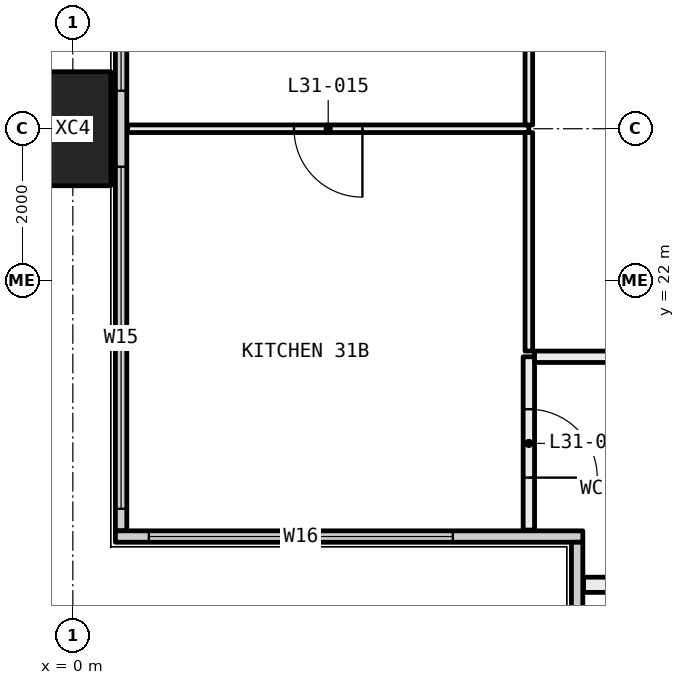
"""IFC4 building model, lengths in metres.
Left out: names, types, materials, properties, quantities, classifications, styles, units other than length and angle.
Written with IfcOpenShell. Run it as: python <this file> out.ifc"""

import sys

from ifc_helpers import new_model, si_unit, direction, frame, frame_2d, origin, origin_2d, place, context, subcontext, project, spatial, rectangle, hollow_rectangle, extrude, element, fill, save


model = new_model("IFC4")
c1 = context("Model", 3, precision=1e-05, world=origin(), true_north=direction((0.0, 1.0)))
c2 = subcontext(c1, "Body", "Model", "MODEL_VIEW")
j1 = project(units=[si_unit("LENGTHUNIT", "METRE"), si_unit("PLANEANGLEUNIT", "RADIAN")], contexts=[c1])
p1 = place(None, origin())
s1 = spatial("IfcSite", under=j1, at=p1, CompositionType="ELEMENT")
p2 = place(p1, origin())
s2 = spatial("IfcBuilding", under=s1, at=p2, CompositionType="ELEMENT")
p3 = place(p2, frame((0.0, 0.0, 120.75)))
s3 = spatial("IfcBuildingStorey", under=s2, at=p3, CompositionType="ELEMENT", Elevation=120.75)
p4 = place(p3, frame((0.0, 24.0, -0.4), z_axis=(0.0, 0.0, 1.0), x_axis=(0.0, 1.0, 0.0)))
e1 = element("IfcColumn", 1, at=p4, inside=s3, PredefinedType="COLUMN", context=c2, shape_type="SweptSolid", body=[
    extrude(hollow_rectangle(XDim=1.5, YDim=1.0, WallThickness=0.06, at=origin_2d()), origin(), (0.0, 0.0, 1.0), 3.45),
])
p5 = place(p3, frame((0.635, 18.71, 0.0), z_axis=(0.0, 0.0, 1.0), x_axis=(0.0, 1.0, 0.0)))
e2 = element("IfcWall", 2, at=p5, inside=s3, PredefinedType="ELEMENTEDWALL", context=c2, shape_type="SweptSolid", body=[
    extrude(rectangle(XDim=22.58, YDim=0.15, at=frame_2d((11.29, 0.0))), origin(), (0.0, 0.0, 1.0), 3.05),
])
p6 = place(p5, frame((0.29, 0.0, 0.45)))
e3 = element("IfcOpeningElement", 3, at=p6, cuts=e2, PredefinedType="OPENING", context=c2, shape_type="SweptSolid", body=[
    extrude(rectangle(XDim=4.5, YDim=2.55, at=frame_2d((2.25, 1.275))), frame((0.0, 0.085, 0.0), z_axis=(0.0, -1.0, 0.0), x_axis=(1.0, 0.0, 0.0)), (0.0, 0.0, 1.0), 0.17),
])
p7 = place(p5, frame((5.79, 0.0, 0.45)))
e4 = element("IfcOpeningElement", 4, at=p7, cuts=e2, PredefinedType="OPENING", context=c2, shape_type="SweptSolid", body=[
    extrude(rectangle(XDim=3.75, YDim=2.55, at=frame_2d((1.875, 1.275))), frame((0.0, 0.085, 0.0), z_axis=(0.0, -1.0, 0.0), x_axis=(1.0, 0.0, 0.0)), (0.0, 0.0, 1.0), 0.17),
])
p8 = place(p5, frame((13.04, 0.0, 0.45)))
e5 = element("IfcOpeningElement", 5, at=p8, cuts=e2, PredefinedType="OPENING", context=c2, shape_type="SweptSolid", body=[
    extrude(rectangle(XDim=0.75, YDim=2.55, at=frame_2d((0.375, 1.275))), frame((0.0, 0.085, 0.0), z_axis=(0.0, -1.0, 0.0), x_axis=(1.0, 0.0, 0.0)), (0.0, 0.0, 1.0), 0.17),
])
p9 = place(p5, frame((14.79, 0.0, 0.45)))
e6 = element("IfcOpeningElement", 6, at=p9, cuts=e2, PredefinedType="OPENING", context=c2, shape_type="SweptSolid", body=[
    extrude(rectangle(XDim=2.0, YDim=2.55, at=frame_2d((1.0, 1.275))), frame((0.0, 0.085, 0.0), z_axis=(0.0, -1.0, 0.0), x_axis=(1.0, 0.0, 0.0)), (0.0, 0.0, 1.0), 0.17),
])
p10 = place(p5, frame((17.79, 0.0, 0.45)))
e7 = element("IfcOpeningElement", 7, at=p10, cuts=e2, PredefinedType="OPENING", context=c2, shape_type="SweptSolid", body=[
    extrude(rectangle(XDim=4.5, YDim=2.55, at=frame_2d((2.25, 1.275))), frame((0.0, 0.085, 0.0), z_axis=(0.0, -1.0, 0.0), x_axis=(1.0, 0.0, 0.0)), (0.0, 0.0, 1.0), 0.17),
])
p11 = place(p3, frame((0.56, 18.635, 0.0), z_axis=(0.0, 0.0, 1.0), x_axis=(1.0, 0.0, 0.0)))
e8 = element("IfcWall", 8, at=p11, inside=s3, PredefinedType="ELEMENTEDWALL", context=c2, shape_type="SweptSolid", body=[
    extrude(rectangle(XDim=6.15, YDim=0.15, at=frame_2d((3.075, 0.0))), origin(), (0.0, 0.0, 1.0), 3.05),
])
p12 = place(p11, frame((0.44, 0.0, 0.45)))
e9 = element("IfcOpeningElement", 9, at=p12, cuts=e8, PredefinedType="OPENING", context=c2, shape_type="SweptSolid", body=[
    extrude(rectangle(XDim=4.0, YDim=2.55, at=frame_2d((2.0, 1.275))), frame((0.0, 0.085, 0.0), z_axis=(0.0, -1.0, 0.0), x_axis=(1.0, 0.0, 0.0)), (0.0, 0.0, 1.0), 0.17),
])
p13 = place(p3, frame((6.635, 12.71, 0.0), z_axis=(0.0, 0.0, 1.0), x_axis=(0.0, 1.0, 0.0)))
e10 = element("IfcWall", 10, at=p13, inside=s3, PredefinedType="ELEMENTEDWALL", context=c2, shape_type="SweptSolid", body=[
    extrude(rectangle(XDim=5.85, YDim=0.15, at=frame_2d((2.925, 0.0))), origin(), (0.0, 0.0, 1.0), 3.05),
])
p14 = place(p13, frame((0.29, 0.0, 0.45)))
e11 = element("IfcOpeningElement", 11, at=p14, cuts=e10, PredefinedType="OPENING", context=c2, shape_type="SweptSolid", body=[
    extrude(rectangle(XDim=4.0, YDim=2.55, at=frame_2d((2.0, 1.275))), frame((0.0, 0.085, 0.0), z_axis=(0.0, -1.0, 0.0), x_axis=(1.0, 0.0, 0.0)), (0.0, 0.0, 1.0), 0.17),
])
p15 = place(p3, frame((7.8, 18.0, 0.0), z_axis=(0.0, 0.0, 1.0), x_axis=(-1.0, 0.0, 0.0)))
e12 = element("IfcWall", 12, at=p15, inside=s3, PredefinedType="PARTITIONING", context=c2, shape_type="SweptSolid", body=[
    extrude(rectangle(XDim=1.08, YDim=0.2, at=frame_2d((0.54, 0.0))), origin(), (0.0, 0.0, 1.0), 3.05),
])
p16 = place(p3, frame((6.0, 24.0, 0.0), z_axis=(0.0, 0.0, 1.0), x_axis=(-1.0, 0.0, 0.0)))
e13 = element("IfcWall", 13, at=p16, inside=s3, PredefinedType="PARTITIONING", context=c2, shape_type="SweptSolid", body=[
    extrude(rectangle(XDim=5.28, YDim=0.1, at=frame_2d((2.64, 0.0))), origin(), (0.0, 0.0, 1.0), 2.45),
])
p17 = place(p16, frame((2.19, 0.0, 0.0)))
e14 = element("IfcOpeningElement", 14, at=p17, cuts=e13, PredefinedType="OPENING", context=c2, shape_type="SweptSolid", body=[
    extrude(rectangle(XDim=0.9, YDim=2.1, at=frame_2d((0.45, 1.05))), frame((0.0, 0.06, 0.0), z_axis=(0.0, -1.0, 0.0), x_axis=(1.0, 0.0, 0.0)), (0.0, 0.0, 1.0), 0.12),
])
p18 = place(p3, frame((6.0, 18.72, 0.0), z_axis=(0.0, 0.0, 1.0), x_axis=(0.0, 1.0, 0.0)))
e15 = element("IfcWall", 15, at=p18, inside=s3, PredefinedType="PARTITIONING", context=c2, shape_type="SweptSolid", body=[
    extrude(rectangle(XDim=2.28, YDim=0.15, at=frame_2d((1.14, 0.0))), origin(), (0.0, 0.0, 1.0), 3.05),
])
p19 = place(p18, frame((0.69, 0.0, 0.0)))
e16 = element("IfcOpeningElement", 16, at=p19, cuts=e15, PredefinedType="OPENING", context=c2, shape_type="SweptSolid", body=[
    extrude(rectangle(XDim=0.9, YDim=2.1, at=frame_2d((0.45, 1.05))), frame((0.0, 0.085, 0.0), z_axis=(0.0, -1.0, 0.0), x_axis=(1.0, 0.0, 0.0)), (0.0, 0.0, 1.0), 0.17),
])
p20 = place(p3, frame((6.0, 21.075, 0.0), z_axis=(0.0, 0.0, 1.0), x_axis=(0.0, 1.0, 0.0)))
e17 = element("IfcWall", 17, at=p20, inside=s3, PredefinedType="PARTITIONING", context=c2, shape_type="SweptSolid", body=[
    extrude(rectangle(XDim=2.875, YDim=0.1, at=frame_2d((1.438, 0.0))), origin(), (0.0, 0.0, 1.0), 2.45),
])
p21 = place(p3, frame((6.0, 24.05, 0.0), z_axis=(0.0, 0.0, 1.0), x_axis=(0.0, 1.0, 0.0)))
e18 = element("IfcWall", 18, at=p21, inside=s3, PredefinedType="PARTITIONING", context=c2, shape_type="SweptSolid", body=[
    extrude(rectangle(XDim=8.95, YDim=0.1, at=frame_2d((4.475, 0.0))), origin(), (0.0, 0.0, 1.0), 2.45),
])
p22 = place(p3, frame((7.725, 21.0, 0.0), z_axis=(0.0, 0.0, 1.0), x_axis=(-1.0, 0.0, 0.0)))
e19 = element("IfcWall", 19, at=p22, inside=s3, PredefinedType="PARTITIONING", context=c2, shape_type="SweptSolid", body=[
    extrude(rectangle(XDim=1.65, YDim=0.15, at=frame_2d((0.825, 0.0))), origin(), (0.0, 0.0, 1.0), 3.05),
])
p23 = place(p6, origin())
e20 = element("IfcWindow", 20, at=p23, inside=s3, PartitioningType="SINGLE_PANEL", PredefinedType="WINDOW", context=c2, shape_type="SweptSolid", body=[
    extrude(rectangle(XDim=4.5, YDim=2.55, at=frame_2d((2.25, 1.275))), frame((0.0, 0.03, 0.0), z_axis=(0.0, -1.0, 0.0), x_axis=(1.0, 0.0, 0.0)), (0.0, 0.0, 1.0), 0.06),
])
fill(e3, e20)
p24 = place(p7, origin())
e21 = element("IfcWindow", 21, at=p24, inside=s3, PartitioningType="SINGLE_PANEL", PredefinedType="WINDOW", context=c2, shape_type="SweptSolid", body=[
    extrude(rectangle(XDim=3.75, YDim=2.55, at=frame_2d((1.875, 1.275))), frame((0.0, 0.03, 0.0), z_axis=(0.0, -1.0, 0.0), x_axis=(1.0, 0.0, 0.0)), (0.0, 0.0, 1.0), 0.06),
])
fill(e4, e21)
p25 = place(p12, origin())
e22 = element("IfcWindow", 22, at=p25, inside=s3, PartitioningType="SINGLE_PANEL", PredefinedType="WINDOW", context=c2, shape_type="SweptSolid", body=[
    extrude(rectangle(XDim=4.0, YDim=2.55, at=frame_2d((2.0, 1.275))), frame((0.0, 0.03, 0.0), z_axis=(0.0, -1.0, 0.0), x_axis=(1.0, 0.0, 0.0)), (0.0, 0.0, 1.0), 0.06),
])
fill(e9, e22)
p26 = place(p17, origin())
e23 = element("IfcDoor", 23, at=p26, inside=s3, OperationType="SINGLE_SWING_RIGHT", PredefinedType="DOOR", context=c2, shape_type="SweptSolid", body=[
    extrude(rectangle(XDim=0.9, YDim=2.1, at=frame_2d((0.45, 1.05))), frame((0.0, 0.025, 0.0), z_axis=(0.0, -1.0, 0.0), x_axis=(1.0, 0.0, 0.0)), (0.0, 0.0, 1.0), 0.05),
])
fill(e14, e23)
p27 = place(p19, frame((0.9, 0.0, 0.0), x_axis=(-1.0, 0.0, 0.0)))
e24 = element("IfcDoor", 24, at=p27, inside=s3, OperationType="SINGLE_SWING_LEFT", PredefinedType="DOOR", context=c2, shape_type="SweptSolid", body=[
    extrude(rectangle(XDim=0.9, YDim=2.1, at=frame_2d((0.45, 1.05))), frame((0.0, 0.025, 0.0), z_axis=(0.0, -1.0, 0.0), x_axis=(1.0, 0.0, 0.0)), (0.0, 0.0, 1.0), 0.05),
])
fill(e16, e24)
save(model, sys.argv[1])
